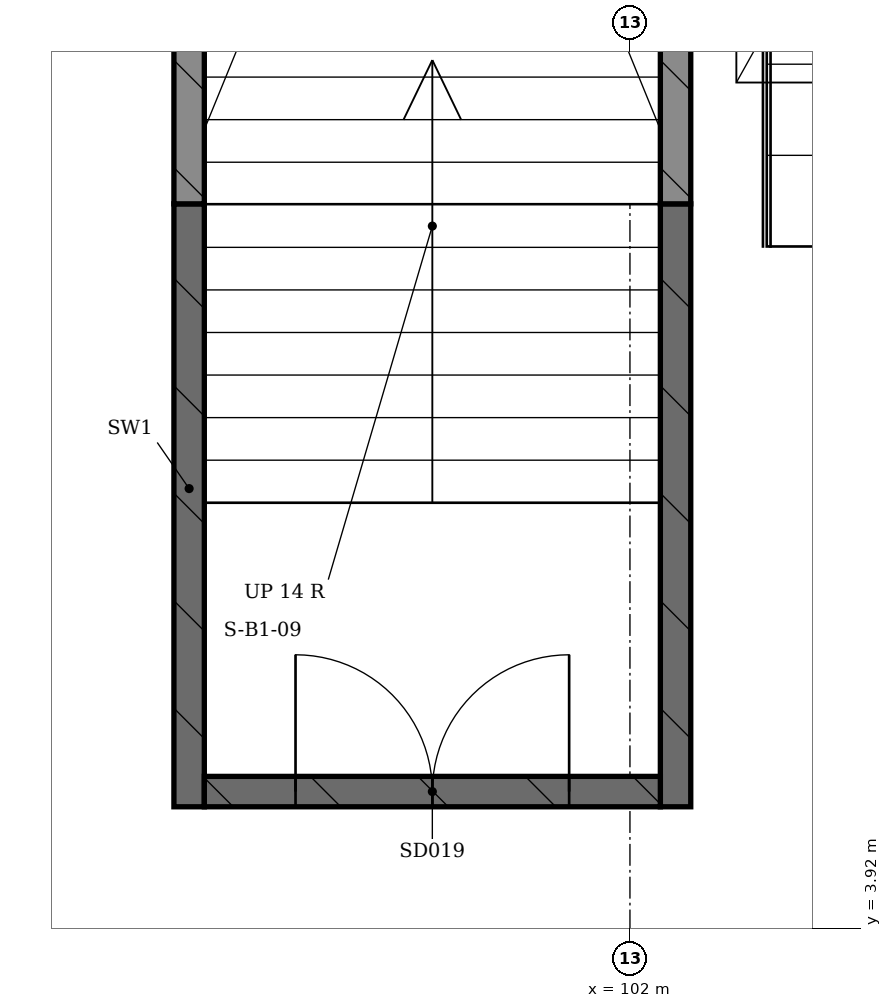
"""IFC4 building model, lengths in metres.
Left out: names, types, materials, properties, quantities, classifications, styles, units other than length and angle.
Written with IfcOpenShell. Run it as: python <this file> out.ifc"""

import sys

from ifc_helpers import new_model, si_unit, direction, frame, frame_2d, origin, place, context, subcontext, project, spatial, rectangle, extrude, element, fill, save


model = new_model("IFC4")
c1 = context("Model", 3, precision=1e-05, world=origin(), true_north=direction((0.0, 1.0)))
c2 = subcontext(c1, "Body", "Model", "MODEL_VIEW")
j1 = project(units=[si_unit("LENGTHUNIT", "METRE"), si_unit("PLANEANGLEUNIT", "RADIAN")], contexts=[c1])
p1 = place(None, origin())
s1 = spatial("IfcSite", under=j1, at=p1, CompositionType="ELEMENT")
p2 = place(p1, origin())
s2 = spatial("IfcBuilding", under=s1, at=p2, CompositionType="ELEMENT")
p3 = place(p2, frame((0.0, 0.0, -4.5)))
s3 = spatial("IfcBuildingStorey", under=s2, at=p3, CompositionType="ELEMENT", Elevation=-4.5)
for number, where, z_axis, x_axis in (
    (1, (99.1, 4.72, 0.0), (0.0, 0.0, 1.0), (0.0, 1.0, 0.0)),
    (2, (102.3, 4.72, 0.0), (0.0, 0.0, 1.0), (0.0, 1.0, 0.0)),
):
    element("IfcWall", number, at=place(p3, frame(where, z_axis=z_axis, x_axis=x_axis)), inside=s3, PredefinedType="SHEAR", context=c2, shape_type="SweptSolid", body=[
        extrude(rectangle(XDim=3.966, YDim=0.2, at=frame_2d((1.983, 0.0))), origin(), (0.0, 0.0, 1.0), 3.5),
    ])
p4 = place(p3, frame((99.2, 4.82, 0.0), z_axis=(0.0, 0.0, 1.0), x_axis=(1.0, 0.0, 0.0)))
e3 = element("IfcWall", 3, at=p4, inside=s3, PredefinedType="SHEAR", context=c2, shape_type="SweptSolid", body=[
    extrude(rectangle(XDim=3.0, YDim=0.2, at=frame_2d((1.5, 0.0))), origin(), (0.0, 0.0, 1.0), 3.5),
])
p5 = place(p4, frame((0.6, 0.0, 0.0)))
e4 = element("IfcOpeningElement", 4, at=p5, cuts=e3, PredefinedType="OPENING", context=c2, shape_type="SweptSolid", body=[
    extrude(rectangle(XDim=1.8, YDim=2.1, at=frame_2d((0.9, 1.05))), frame((0.0, 0.1, 0.0), z_axis=(0.0, -1.0, 0.0), x_axis=(1.0, 0.0, 0.0)), (0.0, 0.0, 1.0), 0.2),
])
for number, where, z_axis, x_axis in (
    (5, (99.1, 8.686, 0.0), (0.0, 0.0, 1.0), (0.0, 1.0, 0.0)),
    (6, (102.3, 8.686, 0.0), (0.0, 0.0, 1.0), (0.0, 1.0, 0.0)),
):
    element("IfcWall", number, at=place(p3, frame(where, z_axis=z_axis, x_axis=x_axis)), inside=s3, PredefinedType="SHEAR", context=c2, shape_type="SweptSolid", body=[
        extrude(rectangle(XDim=8.314, YDim=0.2, at=frame_2d((4.157, 0.0))), origin(), (0.0, 0.0, 1.0), 5.6),
    ])
p6 = place(p5, origin())
e7 = element("IfcDoor", 7, at=p6, inside=s3, OperationType="DOUBLE_DOOR_SINGLE_SWING", PredefinedType="DOOR", context=c2, shape_type="SweptSolid", body=[
    extrude(rectangle(XDim=1.8, YDim=2.1, at=frame_2d((0.9, 1.05))), frame((0.0, 0.025, 0.0), z_axis=(0.0, -1.0, 0.0), x_axis=(1.0, 0.0, 0.0)), (0.0, 0.0, 1.0), 0.05),
])
fill(e4, e7)
save(model, sys.argv[1])
